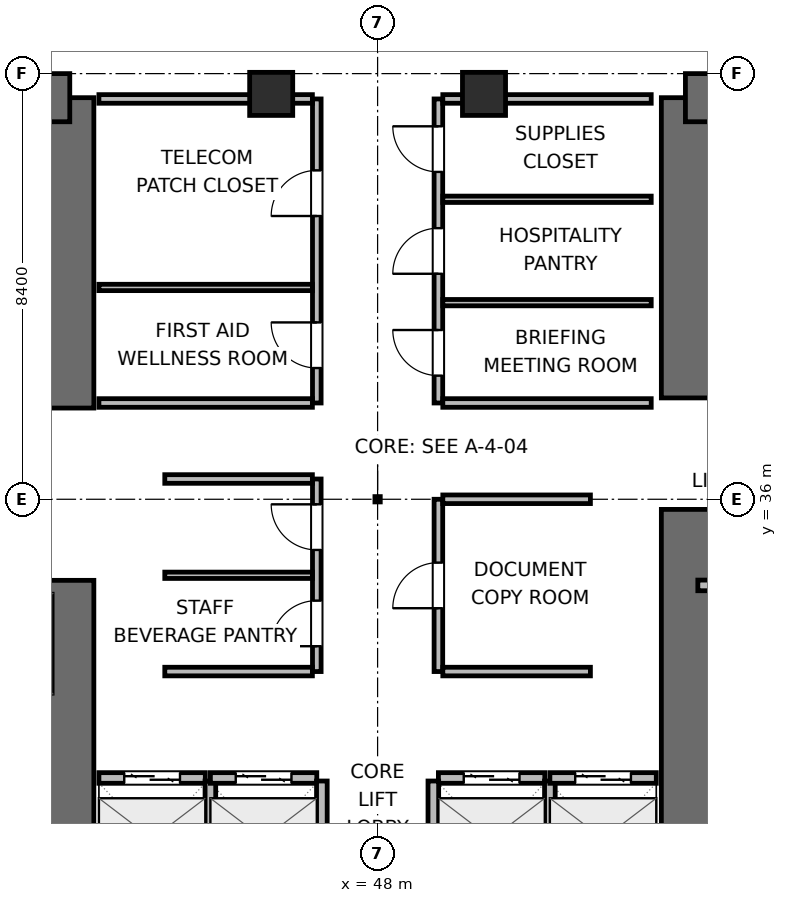
"""IFC4 building model, lengths in metres.
Left out: names, types, materials, properties, quantities, classifications, styles, units other than length and angle.
Written with IfcOpenShell. Run it as: python <this file> out.ifc"""

import sys

from ifc_helpers import new_model, si_unit, direction, frame, frame_2d, origin, origin_2d, place, context, subcontext, project, spatial, rectangle, extrude, element, fill, save


model = new_model("IFC4")
c1 = context("Model", 3, precision=1e-05, world=origin(), true_north=direction((0.0, 1.0)))
c2 = subcontext(c1, "Body", "Model", "MODEL_VIEW")
j1 = project(units=[si_unit("LENGTHUNIT", "METRE"), si_unit("PLANEANGLEUNIT", "RADIAN")], contexts=[c1])
p1 = place(None, origin())
s1 = spatial("IfcSite", under=j1, at=p1, CompositionType="ELEMENT")
p2 = place(p1, origin())
s2 = spatial("IfcBuilding", under=s1, at=p2, CompositionType="ELEMENT")
p3 = place(p2, frame((0.0, 0.0, 56.7)))
s3 = spatial("IfcBuildingStorey", under=s2, at=p3, CompositionType="ELEMENT", Elevation=56.7)
p4 = place(p3, frame((41.925, 28.075, 0.0), z_axis=(0.0, 0.0, 1.0), x_axis=(0.0, 1.0, 0.0)))
e1 = element("IfcWall", 1, at=p4, inside=s3, PredefinedType="SHEAR", context=c2, shape_type="SweptSolid", body=[
    extrude(rectangle(XDim=6.325, YDim=0.95, at=frame_2d((3.163, 0.0))), origin(), (0.0, 0.0, 1.0), 3.9),
])
p5 = place(p3, frame((41.925, 37.8, 0.0), z_axis=(0.0, 0.0, 1.0), x_axis=(0.0, 1.0, 0.0)))
e2 = element("IfcWall", 2, at=p5, inside=s3, PredefinedType="SHEAR", context=c2, shape_type="SweptSolid", body=[
    extrude(rectangle(XDim=6.125, YDim=0.95, at=frame_2d((3.062, 0.0))), origin(), (0.0, 0.0, 1.0), 3.9),
])
p6 = place(p3, frame((32.875, 43.925, 0.0), z_axis=(0.0, 0.0, 1.0), x_axis=(1.0, 0.0, 0.0)))
e3 = element("IfcWall", 3, at=p6, inside=s3, PredefinedType="SHEAR", context=c2, shape_type="SweptSolid", body=[
    extrude(rectangle(XDim=9.05, YDim=0.95, at=frame_2d((4.525, 0.0))), origin(), (0.0, 0.0, 1.0), 3.9),
])
p7 = place(p6, frame((0.975, 0.0, 0.0)))
e4 = element("IfcOpeningElement", 4, at=p7, cuts=e3, PredefinedType="OPENING", context=c2, shape_type="SweptSolid", body=[
    extrude(rectangle(XDim=0.95, YDim=2.04, at=frame_2d((0.475, 1.02))), frame((0.0, 0.485, 0.0), z_axis=(0.0, -1.0, 0.0), x_axis=(1.0, 0.0, 0.0)), (0.0, 0.0, 1.0), 0.97),
])
p8 = place(p6, frame((4.225, 0.0, 0.0)))
e5 = element("IfcOpeningElement", 5, at=p8, cuts=e3, PredefinedType="OPENING", context=c2, shape_type="SweptSolid", body=[
    extrude(rectangle(XDim=0.9, YDim=2.02, at=frame_2d((0.45, 1.01))), frame((0.0, 0.485, 0.0), z_axis=(0.0, -1.0, 0.0), x_axis=(1.0, 0.0, 0.0)), (0.0, 0.0, 1.0), 0.97),
])
p9 = place(p6, frame((7.125, 0.0, 0.0)))
e6 = element("IfcOpeningElement", 6, at=p9, cuts=e3, PredefinedType="OPENING", context=c2, shape_type="SweptSolid", body=[
    extrude(rectangle(XDim=0.9, YDim=2.02, at=frame_2d((0.45, 1.01))), frame((0.0, 0.485, 0.0), z_axis=(0.0, -1.0, 0.0), x_axis=(1.0, 0.0, 0.0)), (0.0, 0.0, 1.0), 0.97),
])
p10 = place(p3, frame((54.075, 28.075, 0.0), z_axis=(0.0, 0.0, 1.0), x_axis=(0.0, 1.0, 0.0)))
e7 = element("IfcWall", 7, at=p10, inside=s3, PredefinedType="SHEAR", context=c2, shape_type="SweptSolid", body=[
    extrude(rectangle(XDim=7.725, YDim=0.95, at=frame_2d((3.863, 0.0))), origin(), (0.0, 0.0, 1.0), 3.9),
])
p11 = place(p3, frame((54.075, 38.0, 0.0), z_axis=(0.0, 0.0, 1.0), x_axis=(0.0, 1.0, 0.0)))
e8 = element("IfcWall", 8, at=p11, inside=s3, PredefinedType="SHEAR", context=c2, shape_type="SweptSolid", body=[
    extrude(rectangle(XDim=5.925, YDim=0.95, at=frame_2d((2.962, 0.0))), origin(), (0.0, 0.0, 1.0), 3.9),
])
p12 = place(p3, frame((54.075, 43.925, 0.0), z_axis=(0.0, 0.0, 1.0), x_axis=(1.0, 0.0, 0.0)))
e9 = element("IfcWall", 9, at=p12, inside=s3, PredefinedType="SHEAR", context=c2, shape_type="SweptSolid", body=[
    extrude(rectangle(XDim=9.05, YDim=0.95, at=frame_2d((4.525, 0.0))), origin(), (0.0, 0.0, 1.0), 3.9),
])
for number, where, z_axis, x_axis in (
    (10, (45.9, 44.0, 0.0), (0.0, 0.0, 1.0), (1.0, 0.0, 0.0)),
    (11, (50.1, 44.0, 0.0), (0.0, 0.0, 1.0), (1.0, 0.0, 0.0)),
):
    element("IfcColumn", number, at=place(p3, frame(where, z_axis=z_axis, x_axis=x_axis)), inside=s3, PredefinedType="COLUMN", context=c2, shape_type="SweptSolid", body=[
        extrude(rectangle(XDim=0.85, YDim=0.85, at=origin_2d()), origin(), (0.0, 0.0, 1.0), 3.9),
    ])
p13 = place(p3, frame((54.32, 34.3, 0.0), z_axis=(0.0, 0.0, 1.0), x_axis=(1.0, 0.0, 0.0)))
e12 = element("IfcWall", 12, at=p13, inside=s3, PredefinedType="PARTITIONING", context=c2, shape_type="SweptSolid", body=[
    extrude(rectangle(XDim=3.48, YDim=0.21, at=frame_2d((1.74, 0.0))), origin(), (0.0, 0.0, 1.0), 3.64),
])
p14 = place(p3, frame((42.5, 30.5, 0.0), z_axis=(0.0, 0.0, 1.0), x_axis=(1.0, 0.0, 0.0)))
e13 = element("IfcWall", 13, at=p14, inside=s3, PredefinedType="PARTITIONING", context=c2, shape_type="SweptSolid", body=[
    extrude(rectangle(XDim=2.1, YDim=0.21, at=frame_2d((1.05, 0.0))), origin(), (0.0, 0.0, 1.0), 3.64),
])
p15 = place(p14, frame((0.5, 0.0, 0.0)))
e14 = element("IfcOpeningElement", 14, at=p15, cuts=e13, PredefinedType="OPENING", context=c2, shape_type="SweptSolid", body=[
    extrude(rectangle(XDim=1.1, YDim=2.04, at=frame_2d((0.55, 1.02))), frame((0.0, 0.115, 0.0), z_axis=(0.0, -1.0, 0.0), x_axis=(1.0, 0.0, 0.0)), (0.0, 0.0, 1.0), 0.23),
])
p16 = place(p3, frame((44.7, 28.16, 0.0), z_axis=(0.0, 0.0, 1.0), x_axis=(0.0, 1.0, 0.0)))
e15 = element("IfcWall", 15, at=p16, inside=s3, PredefinedType="PARTITIONING", context=c2, shape_type="SweptSolid", body=[
    extrude(rectangle(XDim=2.28, YDim=0.21, at=frame_2d((1.14, 0.0))), origin(), (0.0, 0.0, 1.0), 3.64),
])
p17 = place(p3, frame((44.7, 30.5, 0.0), z_axis=(0.0, 0.0, 1.0), x_axis=(1.0, 0.0, 0.0)))
e16 = element("IfcWall", 16, at=p17, inside=s3, PredefinedType="PARTITIONING", context=c2, shape_type="SweptSolid", body=[
    extrude(rectangle(XDim=2.1, YDim=0.21, at=frame_2d((1.05, 0.0))), origin(), (0.0, 0.0, 1.0), 3.64),
])
p18 = place(p17, frame((0.5, 0.0, 0.0)))
e17 = element("IfcOpeningElement", 17, at=p18, cuts=e16, PredefinedType="OPENING", context=c2, shape_type="SweptSolid", body=[
    extrude(rectangle(XDim=1.1, YDim=2.04, at=frame_2d((0.55, 1.02))), frame((0.0, 0.115, 0.0), z_axis=(0.0, -1.0, 0.0), x_axis=(1.0, 0.0, 0.0)), (0.0, 0.0, 1.0), 0.23),
])
p19 = place(p3, frame((46.9, 28.16, 0.0), z_axis=(0.0, 0.0, 1.0), x_axis=(0.0, 1.0, 0.0)))
e18 = element("IfcWall", 18, at=p19, inside=s3, PredefinedType="PARTITIONING", context=c2, shape_type="SweptSolid", body=[
    extrude(rectangle(XDim=2.28, YDim=0.21, at=frame_2d((1.14, 0.0))), origin(), (0.0, 0.0, 1.0), 3.64),
])
p20 = place(p3, frame((49.2, 30.5, 0.0), z_axis=(0.0, 0.0, 1.0), x_axis=(1.0, 0.0, 0.0)))
e19 = element("IfcWall", 19, at=p20, inside=s3, PredefinedType="PARTITIONING", context=c2, shape_type="SweptSolid", body=[
    extrude(rectangle(XDim=2.1, YDim=0.21, at=frame_2d((1.05, 0.0))), origin(), (0.0, 0.0, 1.0), 3.64),
])
p21 = place(p20, frame((0.5, 0.0, 0.0)))
e20 = element("IfcOpeningElement", 20, at=p21, cuts=e19, PredefinedType="OPENING", context=c2, shape_type="SweptSolid", body=[
    extrude(rectangle(XDim=1.1, YDim=2.04, at=frame_2d((0.55, 1.02))), frame((0.0, 0.115, 0.0), z_axis=(0.0, -1.0, 0.0), x_axis=(1.0, 0.0, 0.0)), (0.0, 0.0, 1.0), 0.23),
])
for number, where, z_axis, x_axis in (
    (21, (49.1, 28.16, 0.0), (0.0, 0.0, 1.0), (0.0, 1.0, 0.0)),
    (22, (51.4, 28.16, 0.0), (0.0, 0.0, 1.0), (0.0, 1.0, 0.0)),
):
    element("IfcWall", number, at=place(p3, frame(where, z_axis=z_axis, x_axis=x_axis)), inside=s3, PredefinedType="PARTITIONING", context=c2, shape_type="SweptSolid", body=[
        extrude(rectangle(XDim=2.28, YDim=0.21, at=frame_2d((1.14, 0.0))), origin(), (0.0, 0.0, 1.0), 3.64),
    ])
p22 = place(p3, frame((51.4, 30.5, 0.0), z_axis=(0.0, 0.0, 1.0), x_axis=(1.0, 0.0, 0.0)))
e23 = element("IfcWall", 23, at=p22, inside=s3, PredefinedType="PARTITIONING", context=c2, shape_type="SweptSolid", body=[
    extrude(rectangle(XDim=2.1, YDim=0.21, at=frame_2d((1.05, 0.0))), origin(), (0.0, 0.0, 1.0), 3.64),
])
p23 = place(p22, frame((0.5, 0.0, 0.0)))
e24 = element("IfcOpeningElement", 24, at=p23, cuts=e23, PredefinedType="OPENING", context=c2, shape_type="SweptSolid", body=[
    extrude(rectangle(XDim=1.1, YDim=2.04, at=frame_2d((0.55, 1.02))), frame((0.0, 0.115, 0.0), z_axis=(0.0, -1.0, 0.0), x_axis=(1.0, 0.0, 0.0)), (0.0, 0.0, 1.0), 0.23),
])
p24 = place(p3, frame((46.8, 32.6, 0.0), z_axis=(0.0, 0.0, 1.0), x_axis=(0.0, 1.0, 0.0)))
e25 = element("IfcWall", 25, at=p24, inside=s3, PredefinedType="PARTITIONING", context=c2, shape_type="SweptSolid", body=[
    extrude(rectangle(XDim=3.8, YDim=0.17, at=frame_2d((1.9, 0.0))), origin(), (0.0, 0.0, 1.0), 3.64),
])
p25 = place(p24, frame((0.5, 0.0, 0.0)))
e26 = element("IfcOpeningElement", 26, at=p25, cuts=e25, PredefinedType="OPENING", context=c2, shape_type="SweptSolid", body=[
    extrude(rectangle(XDim=0.9, YDim=2.02, at=frame_2d((0.45, 1.01))), frame((0.0, 0.095, 0.0), z_axis=(0.0, -1.0, 0.0), x_axis=(1.0, 0.0, 0.0)), (0.0, 0.0, 1.0), 0.19),
])
p26 = place(p24, frame((2.4, 0.0, 0.0)))
e27 = element("IfcOpeningElement", 27, at=p26, cuts=e25, PredefinedType="OPENING", context=c2, shape_type="SweptSolid", body=[
    extrude(rectangle(XDim=0.9, YDim=2.02, at=frame_2d((0.45, 1.01))), frame((0.0, 0.095, 0.0), z_axis=(0.0, -1.0, 0.0), x_axis=(1.0, 0.0, 0.0)), (0.0, 0.0, 1.0), 0.19),
])
for number, where, z_axis, x_axis in (
    (28, (43.8, 32.6, 0.0), (0.0, 0.0, 1.0), (1.0, 0.0, 0.0)),
    (29, (43.8, 36.4, 0.0), (0.0, 0.0, 1.0), (1.0, 0.0, 0.0)),
):
    element("IfcWall", number, at=place(p3, frame(where, z_axis=z_axis, x_axis=x_axis)), inside=s3, PredefinedType="PARTITIONING", context=c2, shape_type="SweptSolid", body=[
        extrude(rectangle(XDim=2.913, YDim=0.17, at=frame_2d((1.457, 0.0))), origin(), (0.0, 0.0, 1.0), 3.64),
    ])
p27 = place(p3, frame((43.8, 34.5, 0.0), z_axis=(0.0, 0.0, 1.0), x_axis=(1.0, 0.0, 0.0)))
e30 = element("IfcWall", 30, at=p27, inside=s3, PredefinedType="PARTITIONING", context=c2, shape_type="SweptSolid", body=[
    extrude(rectangle(XDim=2.913, YDim=0.125, at=frame_2d((1.457, 0.0))), origin(), (0.0, 0.0, 1.0), 3.64),
])
p28 = place(p3, frame((49.2, 32.6, 0.0), z_axis=(0.0, 0.0, 1.0), x_axis=(0.0, 1.0, 0.0)))
e31 = element("IfcWall", 31, at=p28, inside=s3, PredefinedType="PARTITIONING", context=c2, shape_type="SweptSolid", body=[
    extrude(rectangle(XDim=3.4, YDim=0.17, at=frame_2d((1.7, 0.0))), origin(), (0.0, 0.0, 1.0), 3.64),
])
p29 = place(p28, frame((1.25, 0.0, 0.0)))
e32 = element("IfcOpeningElement", 32, at=p29, cuts=e31, PredefinedType="OPENING", context=c2, shape_type="SweptSolid", body=[
    extrude(rectangle(XDim=0.9, YDim=2.02, at=frame_2d((0.45, 1.01))), frame((0.0, 0.095, 0.0), z_axis=(0.0, -1.0, 0.0), x_axis=(1.0, 0.0, 0.0)), (0.0, 0.0, 1.0), 0.19),
])
for number, where, z_axis, x_axis in (
    (33, (49.287, 32.6, 0.0), (0.0, 0.0, 1.0), (1.0, 0.0, 0.0)),
    (34, (49.287, 36.0, 0.0), (0.0, 0.0, 1.0), (1.0, 0.0, 0.0)),
):
    element("IfcWall", number, at=place(p3, frame(where, z_axis=z_axis, x_axis=x_axis)), inside=s3, PredefinedType="PARTITIONING", context=c2, shape_type="SweptSolid", body=[
        extrude(rectangle(XDim=2.913, YDim=0.17, at=frame_2d((1.457, 0.0))), origin(), (0.0, 0.0, 1.0), 3.64),
    ])
p30 = place(p3, frame((46.8, 37.9, 0.0), z_axis=(0.0, 0.0, 1.0), x_axis=(0.0, 1.0, 0.0)))
e35 = element("IfcWall", 35, at=p30, inside=s3, PredefinedType="PARTITIONING", context=c2, shape_type="SweptSolid", body=[
    extrude(rectangle(XDim=6.0, YDim=0.17, at=frame_2d((3.0, 0.0))), origin(), (0.0, 0.0, 1.0), 3.64),
])
p31 = place(p30, frame((0.69, 0.0, 0.0)))
e36 = element("IfcOpeningElement", 36, at=p31, cuts=e35, PredefinedType="OPENING", context=c2, shape_type="SweptSolid", body=[
    extrude(rectangle(XDim=0.9, YDim=2.02, at=frame_2d((0.45, 1.01))), frame((0.0, 0.095, 0.0), z_axis=(0.0, -1.0, 0.0), x_axis=(1.0, 0.0, 0.0)), (0.0, 0.0, 1.0), 0.19),
])
p32 = place(p30, frame((3.69, 0.0, 0.0)))
e37 = element("IfcOpeningElement", 37, at=p32, cuts=e35, PredefinedType="OPENING", context=c2, shape_type="SweptSolid", body=[
    extrude(rectangle(XDim=0.9, YDim=2.02, at=frame_2d((0.45, 1.01))), frame((0.0, 0.095, 0.0), z_axis=(0.0, -1.0, 0.0), x_axis=(1.0, 0.0, 0.0)), (0.0, 0.0, 1.0), 0.19),
])
p33 = place(p3, frame((42.5, 37.9, 0.0), z_axis=(0.0, 0.0, 1.0), x_axis=(1.0, 0.0, 0.0)))
e38 = element("IfcWall", 38, at=p33, inside=s3, PredefinedType="PARTITIONING", context=c2, shape_type="SweptSolid", body=[
    extrude(rectangle(XDim=4.213, YDim=0.17, at=frame_2d((2.106, 0.0))), origin(), (0.0, 0.0, 1.0), 3.64),
])
p34 = place(p3, frame((42.5, 43.9, 0.0), z_axis=(0.0, 0.0, 1.0), x_axis=(1.0, 0.0, 0.0)))
e39 = element("IfcWall", 39, at=p34, inside=s3, PredefinedType="PARTITIONING", context=c2, shape_type="SweptSolid", body=[
    extrude(rectangle(XDim=4.213, YDim=0.17, at=frame_2d((2.106, 0.0))), origin(), (0.0, 0.0, 1.0), 2.525),
])
p35 = place(p3, frame((42.5, 40.18, 0.0), z_axis=(0.0, 0.0, 1.0), x_axis=(1.0, 0.0, 0.0)))
e40 = element("IfcWall", 40, at=p35, inside=s3, PredefinedType="PARTITIONING", context=c2, shape_type="SweptSolid", body=[
    extrude(rectangle(XDim=4.213, YDim=0.125, at=frame_2d((2.106, 0.0))), origin(), (0.0, 0.0, 1.0), 3.64),
])
p36 = place(p3, frame((49.2, 37.9, 0.0), z_axis=(0.0, 0.0, 1.0), x_axis=(0.0, 1.0, 0.0)))
e41 = element("IfcWall", 41, at=p36, inside=s3, PredefinedType="PARTITIONING", context=c2, shape_type="SweptSolid", body=[
    extrude(rectangle(XDim=6.0, YDim=0.17, at=frame_2d((3.0, 0.0))), origin(), (0.0, 0.0, 1.0), 3.64),
])
p37 = place(p36, frame((0.54, 0.0, 0.0)))
e42 = element("IfcOpeningElement", 42, at=p37, cuts=e41, PredefinedType="OPENING", context=c2, shape_type="SweptSolid", body=[
    extrude(rectangle(XDim=0.9, YDim=2.02, at=frame_2d((0.45, 1.01))), frame((0.0, 0.095, 0.0), z_axis=(0.0, -1.0, 0.0), x_axis=(1.0, 0.0, 0.0)), (0.0, 0.0, 1.0), 0.19),
])
p38 = place(p36, frame((2.55, 0.0, 0.0)))
e43 = element("IfcOpeningElement", 43, at=p38, cuts=e41, PredefinedType="OPENING", context=c2, shape_type="SweptSolid", body=[
    extrude(rectangle(XDim=0.9, YDim=2.02, at=frame_2d((0.45, 1.01))), frame((0.0, 0.095, 0.0), z_axis=(0.0, -1.0, 0.0), x_axis=(1.0, 0.0, 0.0)), (0.0, 0.0, 1.0), 0.19),
])
p39 = place(p36, frame((4.56, 0.0, 0.0)))
e44 = element("IfcOpeningElement", 44, at=p39, cuts=e41, PredefinedType="OPENING", context=c2, shape_type="SweptSolid", body=[
    extrude(rectangle(XDim=0.9, YDim=2.02, at=frame_2d((0.45, 1.01))), frame((0.0, 0.095, 0.0), z_axis=(0.0, -1.0, 0.0), x_axis=(1.0, 0.0, 0.0)), (0.0, 0.0, 1.0), 0.19),
])
p40 = place(p3, frame((49.287, 37.9, 0.0), z_axis=(0.0, 0.0, 1.0), x_axis=(1.0, 0.0, 0.0)))
e45 = element("IfcWall", 45, at=p40, inside=s3, PredefinedType="PARTITIONING", context=c2, shape_type="SweptSolid", body=[
    extrude(rectangle(XDim=4.113, YDim=0.17, at=frame_2d((2.056, 0.0))), origin(), (0.0, 0.0, 1.0), 3.64),
])
p41 = place(p3, frame((49.287, 43.9, 0.0), z_axis=(0.0, 0.0, 1.0), x_axis=(1.0, 0.0, 0.0)))
e46 = element("IfcWall", 46, at=p41, inside=s3, PredefinedType="PARTITIONING", context=c2, shape_type="SweptSolid", body=[
    extrude(rectangle(XDim=4.113, YDim=0.17, at=frame_2d((2.056, 0.0))), origin(), (0.0, 0.0, 1.0), 2.525),
])
for number, where, z_axis, x_axis in (
    (47, (49.287, 39.88, 0.0), (0.0, 0.0, 1.0), (1.0, 0.0, 0.0)),
    (48, (49.287, 41.92, 0.0), (0.0, 0.0, 1.0), (1.0, 0.0, 0.0)),
):
    element("IfcWall", number, at=place(p3, frame(where, z_axis=z_axis, x_axis=x_axis)), inside=s3, PredefinedType="PARTITIONING", context=c2, shape_type="SweptSolid", body=[
        extrude(rectangle(XDim=4.113, YDim=0.125, at=frame_2d((2.056, 0.0))), origin(), (0.0, 0.0, 1.0), 3.64),
    ])
p42 = place(p15, origin())
e49 = element("IfcDoor", 49, at=p42, inside=s3, OperationType="DOUBLE_DOOR_SLIDING", PredefinedType="DOOR", context=c2, shape_type="SweptSolid", body=[
    extrude(rectangle(XDim=1.1, YDim=2.04, at=frame_2d((0.55, 1.02))), frame((0.0, 0.025, 0.0), z_axis=(0.0, -1.0, 0.0), x_axis=(1.0, 0.0, 0.0)), (0.0, 0.0, 1.0), 0.05),
])
fill(e14, e49)
p43 = place(p18, origin())
e50 = element("IfcDoor", 50, at=p43, inside=s3, OperationType="DOUBLE_DOOR_SLIDING", PredefinedType="DOOR", context=c2, shape_type="SweptSolid", body=[
    extrude(rectangle(XDim=1.1, YDim=2.04, at=frame_2d((0.55, 1.02))), frame((0.0, 0.025, 0.0), z_axis=(0.0, -1.0, 0.0), x_axis=(1.0, 0.0, 0.0)), (0.0, 0.0, 1.0), 0.05),
])
fill(e17, e50)
p44 = place(p21, origin())
e51 = element("IfcDoor", 51, at=p44, inside=s3, OperationType="DOUBLE_DOOR_SLIDING", PredefinedType="DOOR", context=c2, shape_type="SweptSolid", body=[
    extrude(rectangle(XDim=1.1, YDim=2.04, at=frame_2d((0.55, 1.02))), frame((0.0, 0.025, 0.0), z_axis=(0.0, -1.0, 0.0), x_axis=(1.0, 0.0, 0.0)), (0.0, 0.0, 1.0), 0.05),
])
fill(e20, e51)
p45 = place(p23, origin())
e52 = element("IfcDoor", 52, at=p45, inside=s3, OperationType="DOUBLE_DOOR_SLIDING", PredefinedType="DOOR", context=c2, shape_type="SweptSolid", body=[
    extrude(rectangle(XDim=1.1, YDim=2.04, at=frame_2d((0.55, 1.02))), frame((0.0, 0.025, 0.0), z_axis=(0.0, -1.0, 0.0), x_axis=(1.0, 0.0, 0.0)), (0.0, 0.0, 1.0), 0.05),
])
fill(e24, e52)
p46 = place(p25, origin())
e53 = element("IfcDoor", 53, at=p46, inside=s3, OperationType="SINGLE_SWING_LEFT", PredefinedType="DOOR", context=c2, shape_type="SweptSolid", body=[
    extrude(rectangle(XDim=0.9, YDim=2.02, at=frame_2d((0.45, 1.01))), frame((0.0, 0.025, 0.0), z_axis=(0.0, -1.0, 0.0), x_axis=(1.0, 0.0, 0.0)), (0.0, 0.0, 1.0), 0.05),
])
fill(e26, e53)
p47 = place(p26, origin())
e54 = element("IfcDoor", 54, at=p47, inside=s3, OperationType="SINGLE_SWING_RIGHT", PredefinedType="DOOR", context=c2, shape_type="SweptSolid", body=[
    extrude(rectangle(XDim=0.9, YDim=2.02, at=frame_2d((0.45, 1.01))), frame((0.0, 0.025, 0.0), z_axis=(0.0, -1.0, 0.0), x_axis=(1.0, 0.0, 0.0)), (0.0, 0.0, 1.0), 0.05),
])
fill(e27, e54)
p48 = place(p29, origin())
e55 = element("IfcDoor", 55, at=p48, inside=s3, OperationType="SINGLE_SWING_LEFT", PredefinedType="DOOR", context=c2, shape_type="SweptSolid", body=[
    extrude(rectangle(XDim=0.9, YDim=2.02, at=frame_2d((0.45, 1.01))), frame((0.0, 0.025, 0.0), z_axis=(0.0, -1.0, 0.0), x_axis=(1.0, 0.0, 0.0)), (0.0, 0.0, 1.0), 0.05),
])
fill(e32, e55)
p49 = place(p31, origin())
e56 = element("IfcDoor", 56, at=p49, inside=s3, OperationType="SINGLE_SWING_RIGHT", PredefinedType="DOOR", context=c2, shape_type="SweptSolid", body=[
    extrude(rectangle(XDim=0.9, YDim=2.02, at=frame_2d((0.45, 1.01))), frame((0.0, 0.025, 0.0), z_axis=(0.0, -1.0, 0.0), x_axis=(1.0, 0.0, 0.0)), (0.0, 0.0, 1.0), 0.05),
])
fill(e36, e56)
p50 = place(p32, origin())
e57 = element("IfcDoor", 57, at=p50, inside=s3, OperationType="SINGLE_SWING_LEFT", PredefinedType="DOOR", context=c2, shape_type="SweptSolid", body=[
    extrude(rectangle(XDim=0.9, YDim=2.02, at=frame_2d((0.45, 1.01))), frame((0.0, 0.025, 0.0), z_axis=(0.0, -1.0, 0.0), x_axis=(1.0, 0.0, 0.0)), (0.0, 0.0, 1.0), 0.05),
])
fill(e37, e57)
p51 = place(p37, origin())
e58 = element("IfcDoor", 58, at=p51, inside=s3, OperationType="SINGLE_SWING_RIGHT", PredefinedType="DOOR", context=c2, shape_type="SweptSolid", body=[
    extrude(rectangle(XDim=0.9, YDim=2.02, at=frame_2d((0.45, 1.01))), frame((0.0, 0.025, 0.0), z_axis=(0.0, -1.0, 0.0), x_axis=(1.0, 0.0, 0.0)), (0.0, 0.0, 1.0), 0.05),
])
fill(e42, e58)
p52 = place(p38, origin())
e59 = element("IfcDoor", 59, at=p52, inside=s3, OperationType="SINGLE_SWING_LEFT", PredefinedType="DOOR", context=c2, shape_type="SweptSolid", body=[
    extrude(rectangle(XDim=0.9, YDim=2.02, at=frame_2d((0.45, 1.01))), frame((0.0, 0.025, 0.0), z_axis=(0.0, -1.0, 0.0), x_axis=(1.0, 0.0, 0.0)), (0.0, 0.0, 1.0), 0.05),
])
fill(e43, e59)
p53 = place(p39, origin())
e60 = element("IfcDoor", 60, at=p53, inside=s3, OperationType="SINGLE_SWING_RIGHT", PredefinedType="DOOR", context=c2, shape_type="SweptSolid", body=[
    extrude(rectangle(XDim=0.9, YDim=2.02, at=frame_2d((0.45, 1.01))), frame((0.0, 0.025, 0.0), z_axis=(0.0, -1.0, 0.0), x_axis=(1.0, 0.0, 0.0)), (0.0, 0.0, 1.0), 0.05),
])
fill(e44, e60)
save(model, sys.argv[1])
